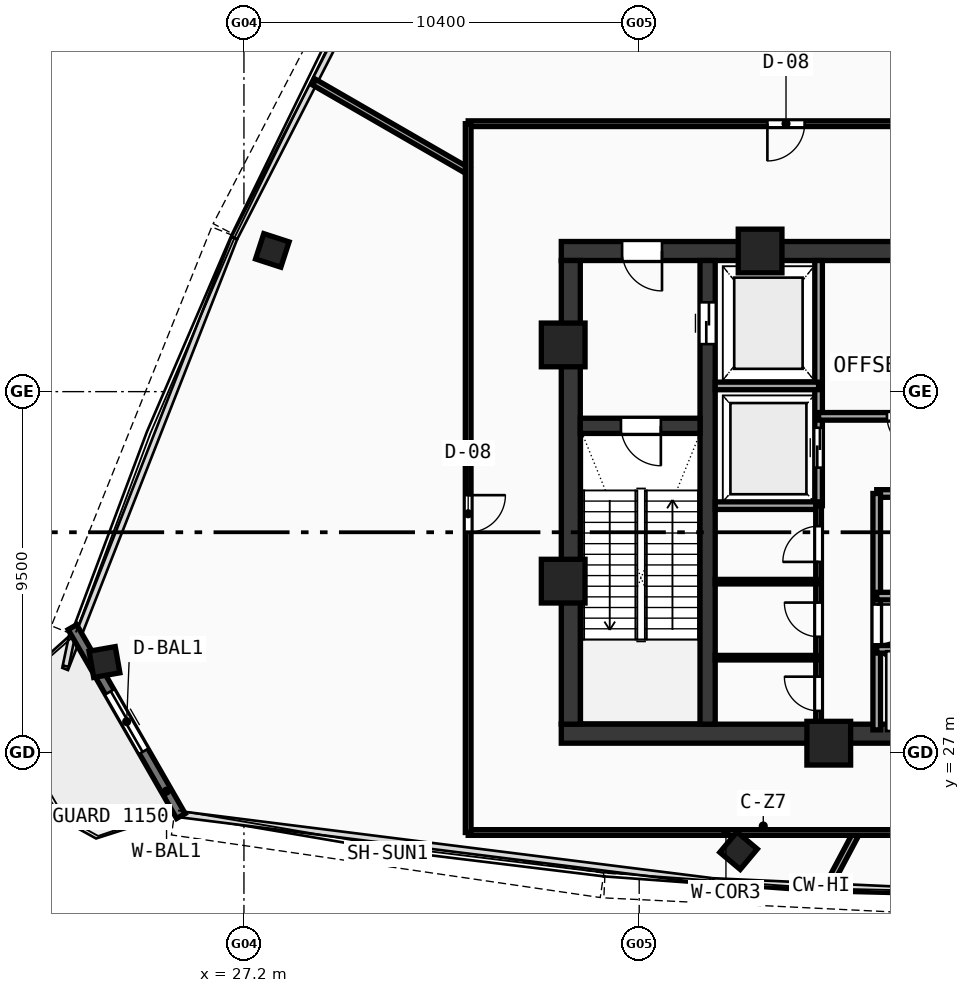
"""IFC4 building model, lengths in metres.
Left out: names, types, materials, properties, quantities, classifications, styles, units other than length and angle.
Written with IfcOpenShell. Run it as: python <this file> out.ifc"""

import sys

from ifc_helpers import new_model, si_unit, direction, frame, frame_2d, origin, origin_with_axes, origin_2d, place, context, subcontext, project, spatial, rectangle, hollow_rectangle, extrude, source, transform, mapped, element, fill, save


model = new_model("IFC4")
c1 = context("Model", 3, precision=1e-05, world=origin(), true_north=direction((0.0, 1.0)))
c2 = subcontext(c1, "Body", "Model", "MODEL_VIEW")
j1 = project(units=[si_unit("LENGTHUNIT", "METRE"), si_unit("PLANEANGLEUNIT", "RADIAN")], contexts=[c1])
p1 = place(None, origin())
s1 = spatial("IfcSite", under=j1, at=p1, CompositionType="ELEMENT")
p2 = place(p1, origin())
s2 = spatial("IfcBuilding", under=s1, at=p2, CompositionType="ELEMENT")
p3 = place(p2, frame((0.0, 0.0, 366.76)))
s3 = spatial("IfcBuildingStorey", under=s2, at=p3, CompositionType="ELEMENT", Elevation=366.76)
p4 = place(p3, frame((35.55, 27.5, 0.0), z_axis=(0.0, 0.0, 1.0), x_axis=(1.0, 0.0, 0.0)))
e1 = element("IfcWall", 1, at=p4, inside=s3, PredefinedType="SHEAR", context=c2, shape_type="SweptSolid", body=[
    extrude(rectangle(XDim=24.9, YDim=0.5, at=frame_2d((12.45, 0.0))), origin(), (0.0, 0.0, 1.0), 4.72),
])
p5 = place(p3, frame((35.55, 40.2, 0.0), z_axis=(0.0, 0.0, 1.0), x_axis=(1.0, 0.0, 0.0)))
e2 = element("IfcWall", 2, at=p5, inside=s3, PredefinedType="SHEAR", context=c2, shape_type="SweptSolid", body=[
    extrude(rectangle(XDim=11.25, YDim=0.5, at=frame_2d((5.625, 0.0))), origin(), (0.0, 0.0, 1.0), 4.72),
])
p6 = place(p5, frame((1.6, 0.0, 0.0)))
e3 = element("IfcOpeningElement", 3, at=p6, cuts=e2, PredefinedType="OPENING", context=c2, shape_type="SweptSolid", body=[
    extrude(rectangle(XDim=1.05, YDim=2.1, at=frame_2d((0.525, 1.05))), frame((0.0, 0.26, 0.0), z_axis=(0.0, -1.0, 0.0), x_axis=(1.0, 0.0, 0.0)), (0.0, 0.0, 1.0), 0.52),
])
p7 = place(p3, frame((35.8, 27.75, 0.0), z_axis=(0.0, 0.0, 1.0), x_axis=(0.0, 1.0, 0.0)))
e4 = element("IfcWall", 4, at=p7, inside=s3, PredefinedType="SHEAR", context=c2, shape_type="SweptSolid", body=[
    extrude(rectangle(XDim=12.2, YDim=0.5, at=frame_2d((6.1, 0.0))), origin(), (0.0, 0.0, 1.0), 4.72),
])
p8 = place(p3, frame((39.4, 27.75, 0.0), z_axis=(0.0, 0.0, 1.0), x_axis=(0.0, 1.0, 0.0)))
e5 = element("IfcWall", 5, at=p8, inside=s3, PredefinedType="SHEAR", context=c2, shape_type="SweptSolid", body=[
    extrude(rectangle(XDim=12.2, YDim=0.4, at=frame_2d((6.1, 0.0))), origin(), (0.0, 0.0, 1.0), 4.72),
])
p9 = place(p8, frame((10.0, 0.0, 0.0)))
e6 = element("IfcOpeningElement", 6, at=p9, cuts=e5, PredefinedType="OPENING", context=c2, shape_type="SweptSolid", body=[
    extrude(rectangle(XDim=1.1, YDim=2.1, at=frame_2d((0.55, 1.05))), frame((0.0, 0.21, 0.0), z_axis=(0.0, -1.0, 0.0), x_axis=(1.0, 0.0, 0.0)), (0.0, 0.0, 1.0), 0.42),
])
p10 = place(p3, frame((36.05, 35.6, 0.0), z_axis=(0.0, 0.0, 1.0), x_axis=(1.0, 0.0, 0.0)))
e7 = element("IfcWall", 7, at=p10, inside=s3, PredefinedType="SHEAR", context=c2, shape_type="SweptSolid", body=[
    extrude(rectangle(XDim=3.15, YDim=0.4, at=frame_2d((1.575, 0.0))), origin(), (0.0, 0.0, 1.0), 4.72),
])
p11 = place(p10, frame((1.07, 0.0, 0.0)))
e8 = element("IfcOpeningElement", 8, at=p11, cuts=e7, PredefinedType="OPENING", context=c2, shape_type="SweptSolid", body=[
    extrude(rectangle(XDim=1.05, YDim=2.1, at=frame_2d((0.525, 1.05))), frame((0.0, 0.21, 0.0), z_axis=(0.0, -1.0, 0.0), x_axis=(1.0, 0.0, 0.0)), (0.0, 0.0, 1.0), 0.42),
])
m1 = source(origin(), c2, "Body", "SweptSolid", [
    extrude(hollow_rectangle(XDim=1.15, YDim=1.15, WallThickness=0.048, at=origin_2d()), origin(), (0.0, 0.0, 1.0), 5.0),
])
for number, where, z_axis, x_axis in (
    (9, (42.588, 27.25, -0.28), (0.0, 0.0, 1.0), (1.0, 0.0, 0.0)),
    (10, (40.781, 40.2, -0.28), (0.0, 0.0, 1.0), (1.0, 0.0, 0.0)),
    (11, (35.6, 37.729, -0.28), (0.0, 0.0, 1.0), (1.0, 0.0, 0.0)),
    (12, (35.6, 31.513, -0.28), (0.0, 0.0, 1.0), (1.0, 0.0, 0.0)),
):
    element("IfcColumn", number, at=place(p3, frame(where, z_axis=z_axis, x_axis=x_axis)), inside=s3, PredefinedType="COLUMN", context=c2, shape_type="MappedRepresentation", body=[
        mapped(m1, transform((0.0, 0.0, 0.0), scale=1.0)),
    ])
m2 = source(origin(), c2, "Body", "SweptSolid", [
    extrude(hollow_rectangle(XDim=0.7, YDim=0.7, WallThickness=0.026, at=origin_2d()), origin(), (0.0, 0.0, 1.0), 5.0),
])
for number, where, z_axis, x_axis in (
    (13, (40.215, 24.422, -0.28), (0.0, 0.0, 1.0), (0.766, -0.643, 0.0)),
    (14, (27.947, 40.216, -0.28), (0.0, 0.0, 1.0), (-0.309, -0.951, 0.0)),
    (15, (23.53, 29.385, -0.28), (0.0, 0.0, 1.0), (0.174, -0.985, 0.0)),
):
    element("IfcColumn", number, at=place(p3, frame(where, z_axis=z_axis, x_axis=x_axis)), inside=s3, PredefinedType="COLUMN", context=c2, shape_type="MappedRepresentation", body=[
        mapped(m2, transform((0.0, 0.0, 0.0), scale=1.0)),
    ])
p12 = place(p3, frame((22.687, 30.304, 0.0), z_axis=(0.0, 0.0, 1.0), x_axis=(0.497922092791, -0.867221764897, 0.0)))
e16 = element("IfcWall", 16, at=p12, inside=s3, PredefinedType="STANDARD", context=c2, shape_type="SweptSolid", body=[
    extrude(rectangle(XDim=5.732, YDim=0.26, at=frame_2d((2.866, 0.0))), origin(), (0.0, 0.0, 1.0), 4.72),
])
p13 = place(p12, frame((1.966, 0.0, 0.0)))
e17 = element("IfcOpeningElement", 17, at=p13, cuts=e16, PredefinedType="OPENING", context=c2, shape_type="SweptSolid", body=[
    extrude(rectangle(XDim=1.8, YDim=2.15, at=frame_2d((0.9, 1.075))), frame((0.0, 0.14, 0.0), z_axis=(0.0, -1.0, 0.0), x_axis=(1.0, 0.0, 0.0)), (0.0, 0.0, 1.0), 0.28),
])
p14 = place(p3, frame((42.32, 33.5, 0.0), z_axis=(0.0, 0.0, 1.0), x_axis=(0.0, 1.0, 0.0)))
e18 = element("IfcWall", 18, at=p14, inside=s3, PredefinedType="SOLIDWALL", context=c2, shape_type="SweptSolid", body=[
    extrude(rectangle(XDim=6.45, YDim=0.2, at=frame_2d((3.225, 0.0))), origin(), (0.0, 0.0, 1.0), 4.72),
])
p15 = place(p14, frame((1.0, 0.0, 0.0)))
e19 = element("IfcOpeningElement", 19, at=p15, cuts=e18, PredefinedType="OPENING", context=c2, shape_type="SweptSolid", body=[
    extrude(rectangle(XDim=1.05, YDim=2.1, at=frame_2d((0.525, 1.05))), frame((0.0, 0.11, 0.0), z_axis=(0.0, -1.0, 0.0), x_axis=(1.0, 0.0, 0.0)), (0.0, 0.0, 1.0), 0.22),
])
for number, where, z_axis, x_axis in (
    (20, (39.6, 36.65, 0.0), (0.0, 0.0, 1.0), (1.0, 0.0, 0.0)),
    (21, (39.6, 33.5, 0.0), (0.0, 0.0, 1.0), (1.0, 0.0, 0.0)),
):
    element("IfcWall", number, at=place(p3, frame(where, z_axis=z_axis, x_axis=x_axis)), inside=s3, PredefinedType="SOLIDWALL", context=c2, shape_type="SweptSolid", body=[
        extrude(rectangle(XDim=2.72, YDim=0.2, at=frame_2d((1.36, 0.0))), origin(), (0.0, 0.0, 1.0), 4.72),
    ])
p16 = place(p3, frame((42.32, 35.85, 0.0), z_axis=(0.0, 0.0, 1.0), x_axis=(1.0, 0.0, 0.0)))
e22 = element("IfcWall", 22, at=p16, inside=s3, PredefinedType="SOLIDWALL", context=c2, shape_type="SweptSolid", body=[
    extrude(rectangle(XDim=4.73, YDim=0.2, at=frame_2d((2.365, 0.0))), origin(), (0.0, 0.0, 1.0), 4.72),
])
p17 = place(p16, frame((1.8, 0.0, 0.0)))
e23 = element("IfcOpeningElement", 23, at=p17, cuts=e22, PredefinedType="OPENING", context=c2, shape_type="SweptSolid", body=[
    extrude(rectangle(XDim=0.9, YDim=2.1, at=frame_2d((0.45, 1.05))), frame((0.0, 0.11, 0.0), z_axis=(0.0, -1.0, 0.0), x_axis=(1.0, 0.0, 0.0)), (0.0, 0.0, 1.0), 0.22),
])
p18 = place(p3, frame((43.85, 33.82, 0.0), z_axis=(0.0, 0.0, 1.0), x_axis=(1.0, 0.0, 0.0)))
e24 = element("IfcWall", 24, at=p18, inside=s3, PredefinedType="SOLIDWALL", context=c2, shape_type="SweptSolid", body=[
    extrude(rectangle(XDim=9.83, YDim=0.2, at=frame_2d((4.915, 0.0))), origin(), (0.0, 0.0, 1.0), 4.72),
])
p19 = place(p18, frame((1.2, 0.0, 0.0)))
e25 = element("IfcOpeningElement", 25, at=p19, cuts=e24, PredefinedType="OPENING", context=c2, shape_type="SweptSolid", body=[
    extrude(rectangle(XDim=0.9, YDim=2.1, at=frame_2d((0.45, 1.05))), frame((0.0, 0.11, 0.0), z_axis=(0.0, -1.0, 0.0), x_axis=(1.0, 0.0, 0.0)), (0.0, 0.0, 1.0), 0.22),
])
p20 = place(p18, frame((7.2, 0.0, 0.0)))
e26 = element("IfcOpeningElement", 26, at=p20, cuts=e24, PredefinedType="OPENING", context=c2, shape_type="SweptSolid", body=[
    extrude(rectangle(XDim=0.9, YDim=2.1, at=frame_2d((0.45, 1.05))), frame((0.0, 0.11, 0.0), z_axis=(0.0, -1.0, 0.0), x_axis=(1.0, 0.0, 0.0)), (0.0, 0.0, 1.0), 0.22),
])
p21 = place(p3, frame((43.85, 27.6, 0.0), z_axis=(0.0, 0.0, 1.0), x_axis=(0.0, 1.0, 0.0)))
e27 = element("IfcWall", 27, at=p21, inside=s3, PredefinedType="SOLIDWALL", context=c2, shape_type="SweptSolid", body=[
    extrude(rectangle(XDim=6.22, YDim=0.2, at=frame_2d((3.11, 0.0))), origin(), (0.0, 0.0, 1.0), 4.72),
])
p22 = place(p21, frame((2.25, 0.0, 0.0)))
e28 = element("IfcOpeningElement", 28, at=p22, cuts=e27, PredefinedType="OPENING", context=c2, shape_type="SweptSolid", body=[
    extrude(rectangle(XDim=1.05, YDim=2.1, at=frame_2d((0.525, 1.05))), frame((0.0, 0.11, 0.0), z_axis=(0.0, -1.0, 0.0), x_axis=(1.0, 0.0, 0.0)), (0.0, 0.0, 1.0), 0.22),
])
p23 = place(p3, frame((43.85, 29.72, 0.0), z_axis=(0.0, 0.0, 1.0), x_axis=(1.0, 0.0, 0.0)))
e29 = element("IfcWall", 29, at=p23, inside=s3, PredefinedType="SOLIDWALL", context=c2, shape_type="SweptSolid", body=[
    extrude(rectangle(XDim=7.2, YDim=0.2, at=frame_2d((3.6, 0.0))), origin(), (0.0, 0.0, 1.0), 4.72),
])
p24 = place(p23, frame((0.625, 0.0, 0.0)))
e30 = element("IfcOpeningElement", 30, at=p24, cuts=e29, PredefinedType="OPENING", context=c2, shape_type="SweptSolid", body=[
    extrude(rectangle(XDim=1.05, YDim=2.1, at=frame_2d((0.525, 1.05))), frame((0.0, 0.11, 0.0), z_axis=(0.0, -1.0, 0.0), x_axis=(1.0, 0.0, 0.0)), (0.0, 0.0, 1.0), 0.22),
])
p25 = place(p23, frame((3.075, 0.0, 0.0)))
e31 = element("IfcOpeningElement", 31, at=p25, cuts=e29, PredefinedType="OPENING", context=c2, shape_type="SweptSolid", body=[
    extrude(rectangle(XDim=1.05, YDim=2.1, at=frame_2d((0.525, 1.05))), frame((0.0, 0.11, 0.0), z_axis=(0.0, -1.0, 0.0), x_axis=(1.0, 0.0, 0.0)), (0.0, 0.0, 1.0), 0.22),
])
p26 = place(p23, frame((5.525, 0.0, 0.0)))
e32 = element("IfcOpeningElement", 32, at=p26, cuts=e29, PredefinedType="OPENING", context=c2, shape_type="SweptSolid", body=[
    extrude(rectangle(XDim=1.05, YDim=2.1, at=frame_2d((0.525, 1.05))), frame((0.0, 0.11, 0.0), z_axis=(0.0, -1.0, 0.0), x_axis=(1.0, 0.0, 0.0)), (0.0, 0.0, 1.0), 0.22),
])
p27 = place(p3, frame((43.85, 31.12, 0.0), z_axis=(0.0, 0.0, 1.0), x_axis=(1.0, 0.0, 0.0)))
e33 = element("IfcWall", 33, at=p27, inside=s3, PredefinedType="SOLIDWALL", context=c2, shape_type="SweptSolid", body=[
    extrude(rectangle(XDim=9.83, YDim=0.2, at=frame_2d((4.915, 0.0))), origin(), (0.0, 0.0, 1.0), 4.72),
])
p28 = place(p3, frame((42.32, 27.6, 0.0), z_axis=(0.0, 0.0, 1.0), x_axis=(0.0, 1.0, 0.0)))
e34 = element("IfcWall", 34, at=p28, inside=s3, PredefinedType="PARTITIONING", context=c2, shape_type="SweptSolid", body=[
    extrude(rectangle(XDim=5.9, YDim=0.15, at=frame_2d((2.95, 0.0))), origin(), (0.0, 0.0, 1.0), 4.72),
])
p29 = place(p28, frame((0.5, 0.0, 0.0)))
e35 = element("IfcOpeningElement", 35, at=p29, cuts=e34, PredefinedType="OPENING", context=c2, shape_type="SweptSolid", body=[
    extrude(rectangle(XDim=0.9, YDim=2.1, at=frame_2d((0.45, 1.05))), frame((0.0, 0.085, 0.0), z_axis=(0.0, -1.0, 0.0), x_axis=(1.0, 0.0, 0.0)), (0.0, 0.0, 1.0), 0.17),
])
p30 = place(p28, frame((2.45, 0.0, 0.0)))
e36 = element("IfcOpeningElement", 36, at=p30, cuts=e34, PredefinedType="OPENING", context=c2, shape_type="SweptSolid", body=[
    extrude(rectangle(XDim=0.9, YDim=2.1, at=frame_2d((0.45, 1.05))), frame((0.0, 0.085, 0.0), z_axis=(0.0, -1.0, 0.0), x_axis=(1.0, 0.0, 0.0)), (0.0, 0.0, 1.0), 0.17),
])
p31 = place(p28, frame((4.42, 0.0, 0.0)))
e37 = element("IfcOpeningElement", 37, at=p31, cuts=e34, PredefinedType="OPENING", context=c2, shape_type="SweptSolid", body=[
    extrude(rectangle(XDim=0.94, YDim=2.1, at=frame_2d((0.47, 1.05))), frame((0.0, 0.085, 0.0), z_axis=(0.0, -1.0, 0.0), x_axis=(1.0, 0.0, 0.0)), (0.0, 0.0, 1.0), 0.17),
])
for number, where, z_axis, x_axis in (
    (38, (39.6, 29.5, 0.0), (0.0, 0.0, 1.0), (1.0, 0.0, 0.0)),
    (39, (39.6, 31.5, 0.0), (0.0, 0.0, 1.0), (1.0, 0.0, 0.0)),
):
    element("IfcWall", number, at=place(p3, frame(where, z_axis=z_axis, x_axis=x_axis)), inside=s3, PredefinedType="PARTITIONING", context=c2, shape_type="SweptSolid", body=[
        extrude(rectangle(XDim=2.72, YDim=0.12, at=frame_2d((1.36, 0.0))), origin(), (0.0, 0.0, 1.0), 4.72),
    ])
p32 = place(p3, frame((33.1, 42.302, 0.0), z_axis=(0.0, 0.0, 1.0), x_axis=(-0.866015242679, 0.500017599138, 0.0)))
e40 = element("IfcWall", 40, at=p32, inside=s3, PredefinedType="PARTITIONING", context=c2, shape_type="SweptSolid", body=[
    extrude(rectangle(XDim=4.678, YDim=0.17, at=frame_2d((2.339, 0.0))), origin(), (0.0, 0.0, 1.0), 4.12),
])
p33 = place(p3, frame((43.321, 24.9, 0.0), z_axis=(0.0, 0.0, 1.0), x_axis=(-0.469477034004, -0.882944683739, 0.0)))
e41 = element("IfcWall", 41, at=p33, inside=s3, PredefinedType="PARTITIONING", context=c2, shape_type="SweptSolid", body=[
    extrude(rectangle(XDim=1.608, YDim=0.17, at=frame_2d((0.804, 0.0))), origin(), (0.0, 0.0, 1.0), 4.12),
])
p34 = place(p3, frame((33.1, 24.9, 0.0), z_axis=(0.0, 0.0, 1.0), x_axis=(1.0, 0.0, 0.0)))
e42 = element("IfcWall", 42, at=p34, inside=s3, PredefinedType="PARTITIONING", context=c2, shape_type="SweptSolid", body=[
    extrude(rectangle(XDim=29.8, YDim=0.15, at=frame_2d((14.9, 0.0))), origin(), (0.0, 0.0, 1.0), 4.12),
])
p35 = place(p34, frame((14.425, 0.0, 0.0)))
e43 = element("IfcOpeningElement", 43, at=p35, cuts=e42, PredefinedType="OPENING", context=c2, shape_type="SweptSolid", body=[
    extrude(rectangle(XDim=0.98, YDim=2.12, at=frame_2d((0.49, 1.06))), frame((0.0, 0.085, 0.0), z_axis=(0.0, -1.0, 0.0), x_axis=(1.0, 0.0, 0.0)), (0.0, 0.0, 1.0), 0.17),
])
p36 = place(p34, frame((26.575, 0.0, 0.0)))
e44 = element("IfcOpeningElement", 44, at=p36, cuts=e42, PredefinedType="OPENING", context=c2, shape_type="SweptSolid", body=[
    extrude(rectangle(XDim=0.98, YDim=2.12, at=frame_2d((0.49, 1.06))), frame((0.0, 0.085, 0.0), z_axis=(0.0, -1.0, 0.0), x_axis=(1.0, 0.0, 0.0)), (0.0, 0.0, 1.0), 0.17),
])
p37 = place(p3, frame((62.9, 43.55, 0.0), z_axis=(0.0, 0.0, 1.0), x_axis=(-1.0, 0.0, 0.0)))
e45 = element("IfcWall", 45, at=p37, inside=s3, PredefinedType="PARTITIONING", context=c2, shape_type="SweptSolid", body=[
    extrude(rectangle(XDim=29.8, YDim=0.15, at=frame_2d((14.9, 0.0))), origin(), (0.0, 0.0, 1.0), 4.12),
])
p38 = place(p37, frame((5.447, 0.0, 0.0)))
e46 = element("IfcOpeningElement", 46, at=p38, cuts=e45, PredefinedType="OPENING", context=c2, shape_type="SweptSolid", body=[
    extrude(rectangle(XDim=0.98, YDim=2.12, at=frame_2d((0.49, 1.06))), frame((0.0, 0.085, 0.0), z_axis=(0.0, -1.0, 0.0), x_axis=(1.0, 0.0, 0.0)), (0.0, 0.0, 1.0), 0.17),
])
p39 = place(p37, frame((20.947, 0.0, 0.0)))
e47 = element("IfcOpeningElement", 47, at=p39, cuts=e45, PredefinedType="OPENING", context=c2, shape_type="SweptSolid", body=[
    extrude(rectangle(XDim=0.98, YDim=2.12, at=frame_2d((0.49, 1.06))), frame((0.0, 0.085, 0.0), z_axis=(0.0, -1.0, 0.0), x_axis=(1.0, 0.0, 0.0)), (0.0, 0.0, 1.0), 0.17),
])
p40 = place(p3, frame((33.1, 43.55, 0.0), z_axis=(0.0, 0.0, 1.0), x_axis=(0.0, -1.0, 0.0)))
e48 = element("IfcWall", 48, at=p40, inside=s3, PredefinedType="PARTITIONING", context=c2, shape_type="SweptSolid", body=[
    extrude(rectangle(XDim=18.65, YDim=0.15, at=frame_2d((9.325, 0.0))), origin(), (0.0, 0.0, 1.0), 4.12),
])
p41 = place(p40, frame((9.774, 0.0, 0.0)))
e49 = element("IfcOpeningElement", 49, at=p41, cuts=e48, PredefinedType="OPENING", context=c2, shape_type="SweptSolid", body=[
    extrude(rectangle(XDim=0.98, YDim=2.12, at=frame_2d((0.49, 1.06))), frame((0.0, 0.085, 0.0), z_axis=(0.0, -1.0, 0.0), x_axis=(1.0, 0.0, 0.0)), (0.0, 0.0, 1.0), 0.17),
])
m3 = source(origin(), c2, "Body", "SweptSolid", [
    extrude(rectangle(XDim=1.8, YDim=2.15, at=frame_2d((0.9, 1.075))), frame((0.0, 0.025, 0.0), z_axis=(0.0, -1.0, 0.0), x_axis=(1.0, 0.0, 0.0)), (0.0, 0.0, 1.0), 0.05),
])
p42 = place(p13, origin_with_axes())
e50 = element("IfcDoor", 50, at=p42, inside=s3, OperationType="DOUBLE_DOOR_SLIDING", PredefinedType="DOOR", context=c2, shape_type="MappedRepresentation", body=[
    mapped(m3, transform((0.0, 0.0, 0.0), scale=1.0)),
])
fill(e17, e50)
m4 = source(origin(), c2, "Body", "SweptSolid", [
    extrude(rectangle(XDim=1.05, YDim=2.1, at=frame_2d((0.525, 1.05))), frame((0.0, 0.025, 0.0), z_axis=(0.0, -1.0, 0.0), x_axis=(1.0, 0.0, 0.0)), (0.0, 0.0, 1.0), 0.05),
])
p43 = place(p11, frame((1.05, 0.0, 0.0), z_axis=(0.0, 0.0, 1.0), x_axis=(-1.0, 0.0, 0.0)))
e51 = element("IfcDoor", 51, at=p43, inside=s3, OperationType="SINGLE_SWING_LEFT", PredefinedType="DOOR", context=c2, shape_type="MappedRepresentation", body=[
    mapped(m4, transform((0.0, 0.0, 0.0), scale=1.0)),
])
fill(e8, e51)
p44 = place(p6, frame((1.05, 0.0, 0.0), z_axis=(0.0, 0.0, 1.0), x_axis=(-1.0, 0.0, 0.0)))
e52 = element("IfcDoor", 52, at=p44, inside=s3, OperationType="SINGLE_SWING_LEFT", PredefinedType="DOOR", context=c2, shape_type="MappedRepresentation", body=[
    mapped(m4, transform((0.0, 0.0, 0.0), scale=1.0)),
])
fill(e3, e52)
m5 = source(origin(), c2, "Body", "SweptSolid", [
    extrude(rectangle(XDim=1.1, YDim=2.1, at=frame_2d((0.55, 1.05))), frame((0.0, 0.025, 0.0), z_axis=(0.0, -1.0, 0.0), x_axis=(1.0, 0.0, 0.0)), (0.0, 0.0, 1.0), 0.05),
])
p45 = place(p9, frame((1.1, 0.0, 0.0), z_axis=(0.0, 0.0, 1.0), x_axis=(-1.0, 0.0, 0.0)))
e53 = element("IfcDoor", 53, at=p45, inside=s3, OperationType="DOUBLE_DOOR_SLIDING", PredefinedType="DOOR", context=c2, shape_type="MappedRepresentation", body=[
    mapped(m5, transform((0.0, 0.0, 0.0), scale=1.0)),
])
fill(e6, e53)
p46 = place(p15, origin_with_axes())
e54 = element("IfcDoor", 54, at=p46, inside=s3, OperationType="DOUBLE_DOOR_SLIDING", PredefinedType="DOOR", context=c2, shape_type="MappedRepresentation", body=[
    mapped(m4, transform((0.0, 0.0, 0.0), scale=1.0)),
])
fill(e19, e54)
m6 = source(origin(), c2, "Body", "SweptSolid", [
    extrude(rectangle(XDim=0.9, YDim=2.1, at=frame_2d((0.45, 1.05))), frame((0.0, 0.025, 0.0), z_axis=(0.0, -1.0, 0.0), x_axis=(1.0, 0.0, 0.0)), (0.0, 0.0, 1.0), 0.05),
])
p47 = place(p17, frame((0.9, 0.0, 0.0), z_axis=(0.0, 0.0, 1.0), x_axis=(-1.0, 0.0, 0.0)))
e55 = element("IfcDoor", 55, at=p47, inside=s3, OperationType="SINGLE_SWING_LEFT", PredefinedType="DOOR", context=c2, shape_type="MappedRepresentation", body=[
    mapped(m6, transform((0.0, 0.0, 0.0), scale=1.0)),
])
fill(e23, e55)
p48 = place(p22, frame((1.05, 0.0, 0.0), z_axis=(0.0, 0.0, 1.0), x_axis=(-1.0, 0.0, 0.0)))
e56 = element("IfcDoor", 56, at=p48, inside=s3, OperationType="SINGLE_SWING_LEFT", PredefinedType="DOOR", context=c2, shape_type="MappedRepresentation", body=[
    mapped(m4, transform((0.0, 0.0, 0.0), scale=1.0)),
])
fill(e28, e56)
p49 = place(p29, origin_with_axes())
e57 = element("IfcDoor", 57, at=p49, inside=s3, OperationType="SINGLE_SWING_RIGHT", PredefinedType="DOOR", context=c2, shape_type="MappedRepresentation", body=[
    mapped(m6, transform((0.0, 0.0, 0.0), scale=1.0)),
])
fill(e35, e57)
p50 = place(p30, origin_with_axes())
e58 = element("IfcDoor", 58, at=p50, inside=s3, OperationType="SINGLE_SWING_RIGHT", PredefinedType="DOOR", context=c2, shape_type="MappedRepresentation", body=[
    mapped(m6, transform((0.0, 0.0, 0.0), scale=1.0)),
])
fill(e36, e58)
m7 = source(origin(), c2, "Body", "SweptSolid", [
    extrude(rectangle(XDim=0.94, YDim=2.1, at=frame_2d((0.47, 1.05))), frame((0.0, 0.025, 0.0), z_axis=(0.0, -1.0, 0.0), x_axis=(1.0, 0.0, 0.0)), (0.0, 0.0, 1.0), 0.05),
])
p51 = place(p31, origin_with_axes())
e59 = element("IfcDoor", 59, at=p51, inside=s3, OperationType="SINGLE_SWING_LEFT", PredefinedType="DOOR", context=c2, shape_type="MappedRepresentation", body=[
    mapped(m7, transform((0.0, 0.0, 0.0), scale=1.0)),
])
fill(e37, e59)
m8 = source(origin(), c2, "Body", "SweptSolid", [
    extrude(rectangle(XDim=0.98, YDim=2.12, at=frame_2d((0.49, 1.06))), frame((0.0, 0.025, 0.0), z_axis=(0.0, -1.0, 0.0), x_axis=(1.0, 0.0, 0.0)), (0.0, 0.0, 1.0), 0.05),
])
p52 = place(p39, origin_with_axes())
e60 = element("IfcDoor", 60, at=p52, inside=s3, OperationType="SINGLE_SWING_RIGHT", PredefinedType="DOOR", context=c2, shape_type="MappedRepresentation", body=[
    mapped(m8, transform((0.0, 0.0, 0.0), scale=1.0)),
])
fill(e47, e60)
p53 = place(p41, origin_with_axes())
e61 = element("IfcDoor", 61, at=p53, inside=s3, OperationType="SINGLE_SWING_LEFT", PredefinedType="DOOR", context=c2, shape_type="MappedRepresentation", body=[
    mapped(m8, transform((0.0, 0.0, 0.0), scale=1.0)),
])
fill(e49, e61)
save(model, sys.argv[1])
